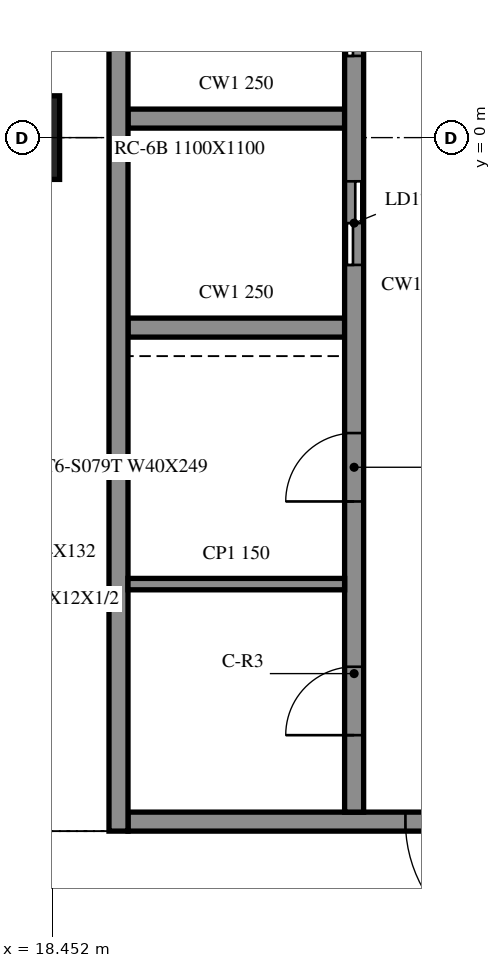
"""IFC4 building model, lengths in metres.
Left out: names, types, materials, properties, quantities, classifications, styles, units other than length and angle.
Written with IfcOpenShell. Run it as: python <this file> out.ifc"""

import sys

from ifc_helpers import new_model, si_unit, direction, frame, frame_2d, origin, origin_2d, place, context, subcontext, project, spatial, rectangle, extrude, element, fill, save


model = new_model("IFC4")
c1 = context("Model", 3, precision=1e-05, world=origin(), true_north=direction((0.0, 1.0)))
c2 = subcontext(c1, "Body", "Model", "MODEL_VIEW")
j1 = project(units=[si_unit("LENGTHUNIT", "METRE"), si_unit("PLANEANGLEUNIT", "RADIAN")], contexts=[c1])
p1 = place(None, origin())
s1 = spatial("IfcSite", under=j1, at=p1, CompositionType="ELEMENT")
p2 = place(p1, origin())
s2 = spatial("IfcBuilding", under=s1, at=p2, CompositionType="ELEMENT")
p3 = place(p2, frame((0.0, 0.0, 224.3)))
s3 = spatial("IfcBuildingStorey", under=s2, at=p3, CompositionType="ELEMENT", Elevation=224.3)
p4 = place(p3, frame((18.0, 0.0, -0.4), z_axis=(0.0, 0.0, 1.0), x_axis=(1.0, 0.0, 0.0)))
e1 = element("IfcColumn", 1, at=p4, inside=s3, PredefinedType="COLUMN", context=c2, shape_type="SweptSolid", body=[
    extrude(rectangle(XDim=1.1, YDim=1.1, at=origin_2d()), origin(), (0.0, 0.0, 1.0), 4.36),
])
p5 = place(p3, frame((19.325, 15.125, 0.0), z_axis=(0.0, 0.0, 1.0), x_axis=(0.0, -1.0, 0.0)))
e2 = element("IfcWall", 2, at=p5, inside=s3, PredefinedType="SOLIDWALL", context=c2, shape_type="SweptSolid", body=[
    extrude(rectangle(XDim=24.25, YDim=0.25, at=frame_2d((12.125, 0.0))), origin(), (0.0, 0.0, 1.0), 3.96),
])
p6 = place(p3, frame((28.55, -9.0, 0.0), z_axis=(0.0, 0.0, 1.0), x_axis=(-1.0, 0.0, 0.0)))
e3 = element("IfcWall", 3, at=p6, inside=s3, PredefinedType="SOLIDWALL", context=c2, shape_type="SweptSolid", body=[
    extrude(rectangle(XDim=9.1, YDim=0.25, at=frame_2d((4.55, 0.0))), origin(), (0.0, 0.0, 1.0), 3.96),
])
p7 = place(p6, frame((3.65, 0.0, 0.0)))
e4 = element("IfcOpeningElement", 4, at=p7, cuts=e3, PredefinedType="OPENING", context=c2, shape_type="SweptSolid", body=[
    extrude(rectangle(XDim=1.8, YDim=2.1, at=frame_2d((0.9, 1.05))), frame((0.0, 0.135, 0.0), z_axis=(0.0, -1.0, 0.0), x_axis=(1.0, 0.0, 0.0)), (0.0, 0.0, 1.0), 0.27),
])
p8 = place(p3, frame((22.425, -8.875, 0.0), z_axis=(0.0, 0.0, 1.0), x_axis=(0.0, 1.0, 0.0)))
e5 = element("IfcWall", 5, at=p8, inside=s3, PredefinedType="SOLIDWALL", context=c2, shape_type="SweptSolid", body=[
    extrude(rectangle(XDim=17.5, YDim=0.25, at=frame_2d((8.75, 0.0))), origin(), (0.0, 0.0, 1.0), 3.96),
])
p9 = place(p8, frame((7.2, 0.0, 0.0)))
e6 = element("IfcOpeningElement", 6, at=p9, cuts=e5, PredefinedType="OPENING", context=c2, shape_type="SweptSolid", body=[
    extrude(rectangle(XDim=1.1, YDim=2.1, at=frame_2d((0.55, 1.05))), frame((0.0, 0.135, 0.0), z_axis=(0.0, -1.0, 0.0), x_axis=(1.0, 0.0, 0.0)), (0.0, 0.0, 1.0), 0.27),
])
p10 = place(p8, frame((9.95, 0.0, 0.0)))
e7 = element("IfcOpeningElement", 7, at=p10, cuts=e5, PredefinedType="OPENING", context=c2, shape_type="SweptSolid", body=[
    extrude(rectangle(XDim=1.1, YDim=2.1, at=frame_2d((0.55, 1.05))), frame((0.0, 0.135, 0.0), z_axis=(0.0, -1.0, 0.0), x_axis=(1.0, 0.0, 0.0)), (0.0, 0.0, 1.0), 0.27),
])
p11 = place(p8, frame((12.7, 0.0, 0.0)))
e8 = element("IfcOpeningElement", 8, at=p11, cuts=e5, PredefinedType="OPENING", context=c2, shape_type="SweptSolid", body=[
    extrude(rectangle(XDim=1.1, YDim=2.1, at=frame_2d((0.55, 1.05))), frame((0.0, 0.135, 0.0), z_axis=(0.0, -1.0, 0.0), x_axis=(1.0, 0.0, 0.0)), (0.0, 0.0, 1.0), 0.27),
])
p12 = place(p8, frame((15.45, 0.0, 0.0)))
e9 = element("IfcOpeningElement", 9, at=p12, cuts=e5, PredefinedType="OPENING", context=c2, shape_type="SweptSolid", body=[
    extrude(rectangle(XDim=1.1, YDim=2.1, at=frame_2d((0.55, 1.05))), frame((0.0, 0.135, 0.0), z_axis=(0.0, -1.0, 0.0), x_axis=(1.0, 0.0, 0.0)), (0.0, 0.0, 1.0), 0.27),
])
p13 = place(p8, frame((1.012, 0.0, 0.0)))
e10 = element("IfcOpeningElement", 10, at=p13, cuts=e5, PredefinedType="OPENING", context=c2, shape_type="SweptSolid", body=[
    extrude(rectangle(XDim=0.9, YDim=2.1, at=frame_2d((0.45, 1.05))), frame((0.0, 0.135, 0.0), z_axis=(0.0, -1.0, 0.0), x_axis=(1.0, 0.0, 0.0)), (0.0, 0.0, 1.0), 0.27),
])
p14 = place(p8, frame((4.087, 0.0, 0.0)))
e11 = element("IfcOpeningElement", 11, at=p14, cuts=e5, PredefinedType="OPENING", context=c2, shape_type="SweptSolid", body=[
    extrude(rectangle(XDim=0.9, YDim=2.1, at=frame_2d((0.45, 1.05))), frame((0.0, 0.135, 0.0), z_axis=(0.0, -1.0, 0.0), x_axis=(1.0, 0.0, 0.0)), (0.0, 0.0, 1.0), 0.27),
])
for number, where, z_axis, x_axis in (
    (12, (19.45, -2.5, 0.0), (0.0, 0.0, 1.0), (1.0, 0.0, 0.0)),
    (13, (19.45, 0.25, 0.0), (0.0, 0.0, 1.0), (1.0, 0.0, 0.0)),
):
    element("IfcWall", number, at=place(p3, frame(where, z_axis=z_axis, x_axis=x_axis)), inside=s3, PredefinedType="SOLIDWALL", context=c2, shape_type="SweptSolid", body=[
        extrude(rectangle(XDim=2.85, YDim=0.25, at=frame_2d((1.425, 0.0))), origin(), (0.0, 0.0, 1.0), 3.96),
    ])
p15 = place(p3, frame((19.45, -5.875, 0.0), z_axis=(0.0, 0.0, 1.0), x_axis=(1.0, 0.0, 0.0)))
e14 = element("IfcWall", 14, at=p15, inside=s3, PredefinedType="PARTITIONING", context=c2, shape_type="SweptSolid", body=[
    extrude(rectangle(XDim=2.85, YDim=0.15, at=frame_2d((1.425, 0.0))), origin(), (0.0, 0.0, 1.0), 3.96),
])
p16 = place(p7, origin())
e15 = element("IfcDoor", 15, at=p16, inside=s3, OperationType="DOUBLE_DOOR_SINGLE_SWING", PredefinedType="DOOR", context=c2, shape_type="SweptSolid", body=[
    extrude(rectangle(XDim=1.8, YDim=2.1, at=frame_2d((0.9, 1.05))), frame((0.0, 0.025, 0.0), z_axis=(0.0, -1.0, 0.0), x_axis=(1.0, 0.0, 0.0)), (0.0, 0.0, 1.0), 0.05),
])
fill(e4, e15)
p17 = place(p9, origin())
e16 = element("IfcDoor", 16, at=p17, inside=s3, OperationType="DOUBLE_DOOR_SLIDING", PredefinedType="DOOR", context=c2, shape_type="SweptSolid", body=[
    extrude(rectangle(XDim=1.1, YDim=2.1, at=frame_2d((0.55, 1.05))), frame((0.0, 0.025, 0.0), z_axis=(0.0, -1.0, 0.0), x_axis=(1.0, 0.0, 0.0)), (0.0, 0.0, 1.0), 0.05),
])
fill(e6, e16)
p18 = place(p10, origin())
e17 = element("IfcDoor", 17, at=p18, inside=s3, OperationType="DOUBLE_DOOR_SLIDING", PredefinedType="DOOR", context=c2, shape_type="SweptSolid", body=[
    extrude(rectangle(XDim=1.1, YDim=2.1, at=frame_2d((0.55, 1.05))), frame((0.0, 0.025, 0.0), z_axis=(0.0, -1.0, 0.0), x_axis=(1.0, 0.0, 0.0)), (0.0, 0.0, 1.0), 0.05),
])
fill(e7, e17)
p19 = place(p13, origin())
e18 = element("IfcDoor", 18, at=p19, inside=s3, OperationType="SINGLE_SWING_LEFT", PredefinedType="DOOR", context=c2, shape_type="SweptSolid", body=[
    extrude(rectangle(XDim=0.9, YDim=2.1, at=frame_2d((0.45, 1.05))), frame((0.0, 0.025, 0.0), z_axis=(0.0, -1.0, 0.0), x_axis=(1.0, 0.0, 0.0)), (0.0, 0.0, 1.0), 0.05),
])
fill(e10, e18)
p20 = place(p14, origin())
e19 = element("IfcDoor", 19, at=p20, inside=s3, OperationType="SINGLE_SWING_RIGHT", PredefinedType="DOOR", context=c2, shape_type="SweptSolid", body=[
    extrude(rectangle(XDim=0.9, YDim=2.1, at=frame_2d((0.45, 1.05))), frame((0.0, 0.025, 0.0), z_axis=(0.0, -1.0, 0.0), x_axis=(1.0, 0.0, 0.0)), (0.0, 0.0, 1.0), 0.05),
])
fill(e11, e19)
save(model, sys.argv[1])
